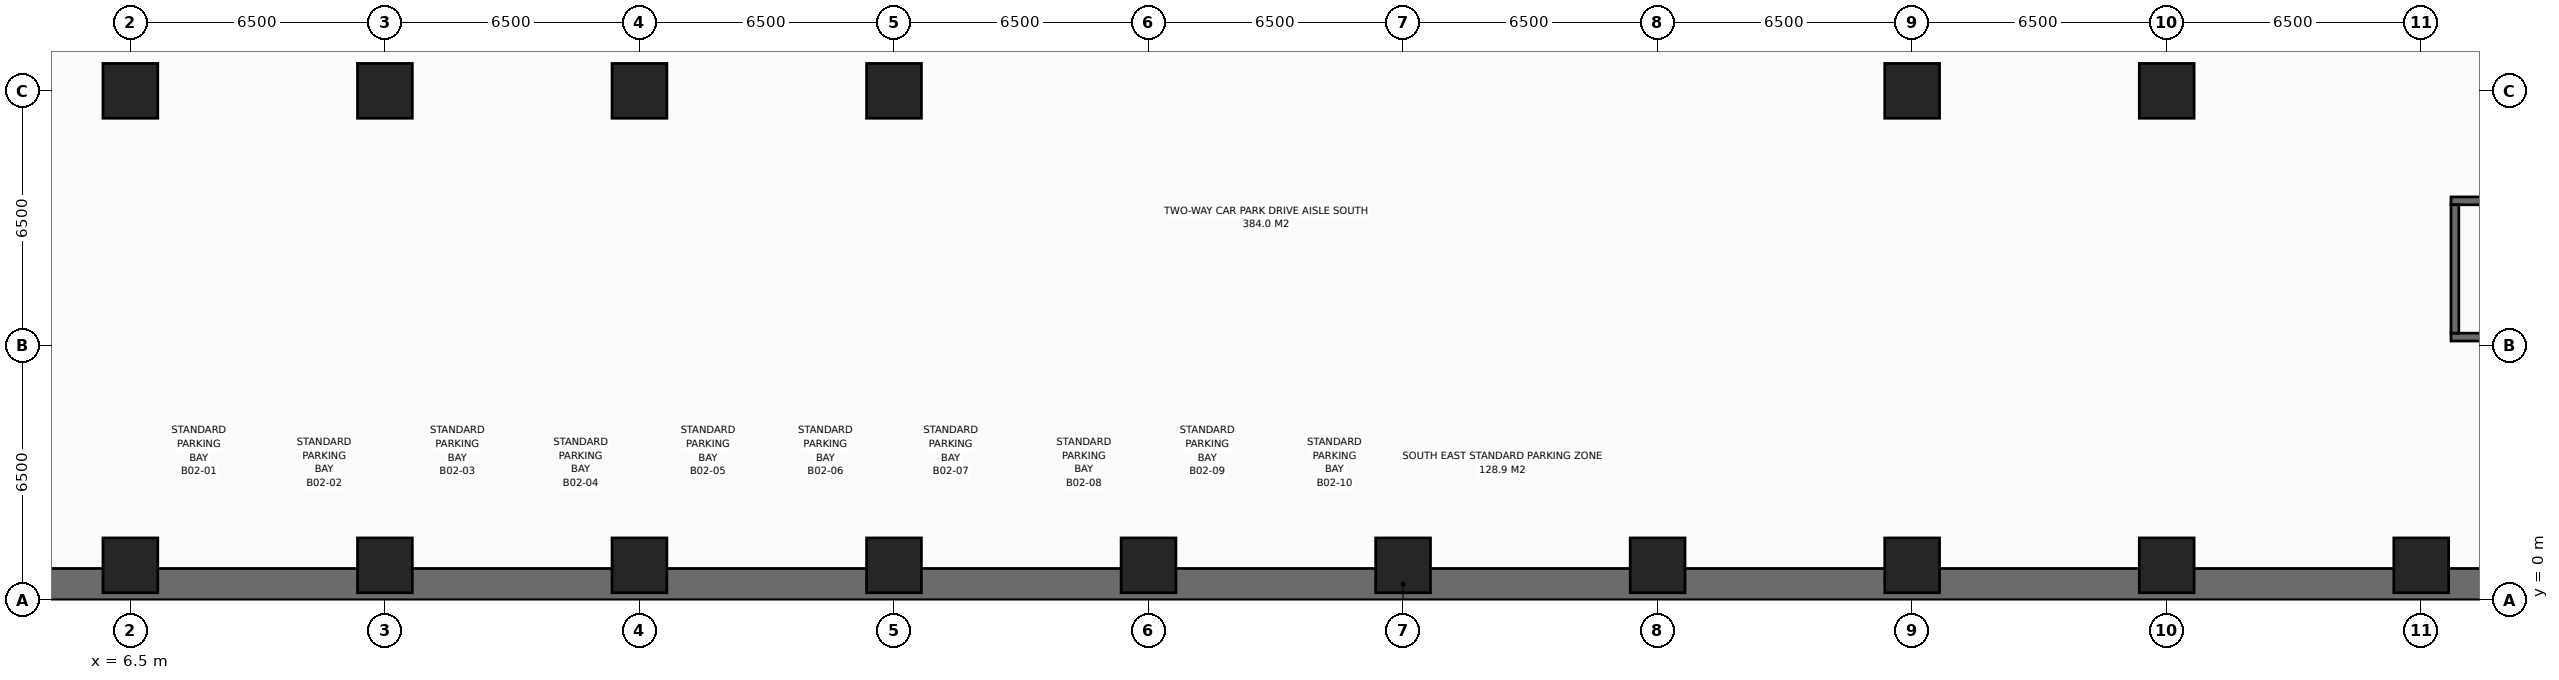
"""IFC4 building model, lengths in metres.
Left out: names, types, materials, properties, quantities, classifications, styles, units other than length and angle.
Written with IfcOpenShell. Run it as: python <this file> out.ifc"""

import sys

from ifc_helpers import new_model, si_unit, direction, frame, frame_2d, origin, origin_2d, place, context, subcontext, project, spatial, rectangle, extrude, element, save


model = new_model("IFC4")
c1 = context("Model", 3, precision=1e-05, world=origin(), true_north=direction((0.0, 1.0)))
c2 = subcontext(c1, "Body", "Model", "MODEL_VIEW")
j1 = project(units=[si_unit("LENGTHUNIT", "METRE"), si_unit("PLANEANGLEUNIT", "RADIAN")], contexts=[c1])
p1 = place(None, origin())
s1 = spatial("IfcSite", under=j1, at=p1, CompositionType="ELEMENT")
p2 = place(p1, origin())
s2 = spatial("IfcBuilding", under=s1, at=p2, CompositionType="ELEMENT")
p3 = place(p2, frame((0.0, 0.0, -9.0)))
s3 = spatial("IfcBuildingStorey", under=s2, at=p3, CompositionType="ELEMENT", Elevation=-9.0)
p4 = place(p3, frame((-0.2, 0.4, 0.0), z_axis=(0.0, 0.0, 1.0), x_axis=(1.0, 0.0, 0.0)))
e1 = element("IfcWall", 1, at=p4, inside=s3, PredefinedType="USERDEFINED", context=c2, shape_type="SweptSolid", body=[
    extrude(rectangle(XDim=78.4, YDim=0.8, at=frame_2d((39.2, 0.0))), origin(), (0.0, 0.0, 1.0), 4.2),
])
for number, where, z_axis, x_axis in (
    (2, (65.76, 6.71, 0.0), (0.0, 0.0, 1.0), (1.0, 0.0, 0.0)),
    (3, (65.76, 10.19, 0.0), (0.0, 0.0, 1.0), (1.0, 0.0, 0.0)),
):
    element("IfcWall", number, at=place(p3, frame(where, z_axis=z_axis, x_axis=x_axis)), inside=s3, PredefinedType="SHEAR", context=c2, shape_type="SweptSolid", body=[
        extrude(rectangle(XDim=8.43, YDim=0.2, at=frame_2d((4.215, 0.0))), origin(), (0.0, 0.0, 1.0), 4.5),
    ])
p5 = place(p3, frame((65.86, 6.81, 0.0), z_axis=(0.0, 0.0, 1.0), x_axis=(0.0, 1.0, 0.0)))
e4 = element("IfcWall", 4, at=p5, inside=s3, PredefinedType="SHEAR", context=c2, shape_type="SweptSolid", body=[
    extrude(rectangle(XDim=3.28, YDim=0.2, at=frame_2d((1.64, 0.0))), origin(), (0.0, 0.0, 1.0), 4.5),
])
for number, where, z_axis, x_axis in (
    (5, (58.5, 13.0, 0.0), (0.0, 0.0, 1.0), (1.0, 0.0, 0.0)),
    (6, (6.5, 13.0, 0.0), (0.0, 0.0, 1.0), (1.0, 0.0, 0.0)),
    (7, (13.0, 13.0, 0.0), (0.0, 0.0, 1.0), (1.0, 0.0, 0.0)),
    (8, (19.5, 13.0, 0.0), (0.0, 0.0, 1.0), (1.0, 0.0, 0.0)),
    (9, (26.0, 13.0, 0.0), (0.0, 0.0, 1.0), (1.0, 0.0, 0.0)),
    (10, (52.0, 13.0, 0.0), (0.0, 0.0, 1.0), (1.0, 0.0, 0.0)),
    (11, (6.5, 0.88, 0.0), (0.0, 0.0, 1.0), (1.0, 0.0, 0.0)),
    (12, (13.0, 0.88, 0.0), (0.0, 0.0, 1.0), (1.0, 0.0, 0.0)),
    (13, (19.5, 0.88, 0.0), (0.0, 0.0, 1.0), (1.0, 0.0, 0.0)),
    (14, (26.0, 0.88, 0.0), (0.0, 0.0, 1.0), (1.0, 0.0, 0.0)),
    (15, (32.5, 0.88, 0.0), (0.0, 0.0, 1.0), (1.0, 0.0, 0.0)),
    (16, (39.0, 0.88, 0.0), (0.0, 0.0, 1.0), (1.0, 0.0, 0.0)),
    (17, (45.5, 0.88, 0.0), (0.0, 0.0, 1.0), (1.0, 0.0, 0.0)),
    (18, (52.0, 0.88, 0.0), (0.0, 0.0, 1.0), (1.0, 0.0, 0.0)),
    (19, (58.5, 0.88, 0.0), (0.0, 0.0, 1.0), (1.0, 0.0, 0.0)),
    (20, (65.0, 0.88, 0.0), (0.0, 0.0, 1.0), (1.0, 0.0, 0.0)),
):
    element("IfcColumn", number, at=place(p3, frame(where, z_axis=z_axis, x_axis=x_axis)), inside=s3, PredefinedType="COLUMN", context=c2, shape_type="SweptSolid", body=[
        extrude(rectangle(XDim=1.4, YDim=1.4, at=origin_2d()), origin(), (0.0, 0.0, 1.0), 4.5),
    ])
save(model, sys.argv[1])
